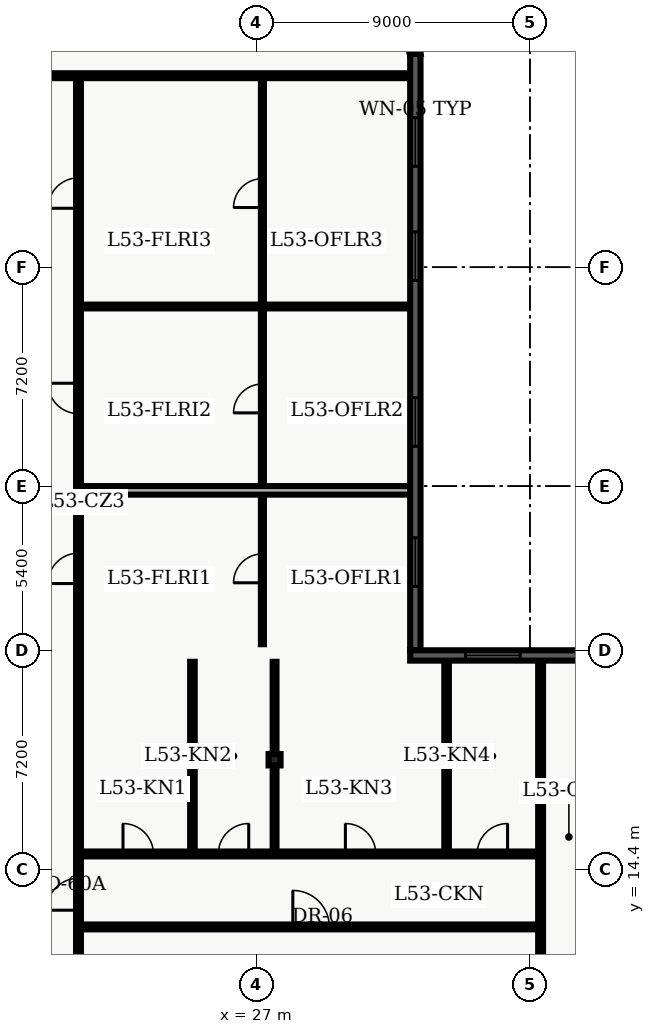
"""IFC4 building model, lengths in metres.
Left out: names, types, materials, properties, quantities, classifications, styles, units other than length and angle.
Written with IfcOpenShell. Run it as: python <this file> out.ifc"""

import sys

from ifc_helpers import new_model, entity, si_unit, converted_unit, direction, frame, origin_with_axes, origin_2d_with_axis, place, context, subcontext, project, spatial, polyline, rectangle, i_section, outline, extrude, element, fill, save


model = new_model("IFC4")
c1 = context("Model", 3, precision=1e-05, world=origin_with_axes(), true_north=direction((0.0, 1.0)))
c2 = subcontext(c1, "Body", "Model", "MODEL_VIEW")
j1 = project(units=[si_unit("LENGTHUNIT", "METRE"), converted_unit("PLANEANGLEUNIT", "DEGREE", entity("IfcPlaneAngleMeasure", 0.017), si_unit("PLANEANGLEUNIT", "RADIAN"), dimensions=[0, 0, 0, 0, 0, 0, 0])], contexts=[c1])
p1 = place(None, origin_with_axes())
s1 = spatial("IfcSite", under=j1, at=p1, CompositionType="ELEMENT")
p2 = place(p1, origin_with_axes())
s2 = spatial("IfcBuilding", under=s1, at=p2, CompositionType="ELEMENT")
p3 = place(p2, frame((0.0, 0.0, 216.0), z_axis=(0.0, 0.0, 1.0), x_axis=(1.0, 0.0, 0.0)))
s3 = spatial("IfcBuildingStorey", under=s2, at=p3, CompositionType="ELEMENT", Elevation=216.0)
p4 = place(p3, frame((27.6, 18.0, 0.0), z_axis=(0.0, 0.0, 1.0), x_axis=(1.0, 0.0, 0.0)))
e1 = element("IfcColumn", 1, at=p4, inside=s3, PredefinedType="COLUMN", context=c2, shape_type="SweptSolid", body=[
    extrude(i_section(OverallWidth=0.394, OverallDepth=0.375, WebThickness=0.017, FlangeThickness=0.028, FilletRadius=0.02, at=origin_2d_with_axis()), origin_with_axes(), (0.0, 0.0, 1.0), 3.9),
])
p5 = place(p3, frame((2.6, 40.5, 0.0), z_axis=(0.0, 0.0, 1.0), x_axis=(1.0, 0.0, 0.0)))
e2 = element("IfcWall", 2, at=p5, inside=s3, PredefinedType="PARTITIONING", context=c2, shape_type="SweptSolid", body=[
    extrude(outline(polyline([(0.0, -0.08), (29.465, -0.08), (29.465, 0.08), (0.0, 0.08), (0.0, -0.08)])), origin_with_axes(), (0.0, 0.0, 1.0), 2.64),
])
p6 = place(p5, frame((8.755, 0.0, 0.0), z_axis=(0.0, 0.0, 1.0), x_axis=(1.0, 0.0, 0.0)))
e3 = element("IfcOpeningElement", 3, at=p6, cuts=e2, PredefinedType="OPENING", context=c2, shape_type="SweptSolid", body=[
    extrude(rectangle(XDim=1.0, YDim=0.18, at=origin_2d_with_axis()), origin_with_axes(), (0.0, 0.0, 1.0), 2.15),
])
p7 = place(p3, frame((21.15, 7.8, 0.0), z_axis=(0.0, 0.0, 1.0), x_axis=(0.0, 1.0, 0.0)))
e4 = element("IfcWall", 4, at=p7, inside=s3, PredefinedType="PARTITIONING", context=c2, shape_type="SweptSolid", body=[
    extrude(outline(polyline([(0.0, -0.08), (32.7, -0.08), (32.7, 0.08), (0.0, 0.08), (0.0, -0.08)])), origin_with_axes(), (0.0, 0.0, 1.0), 2.64),
])
p8 = place(p7, frame((16.495, 0.0, 0.0), z_axis=(0.0, 0.0, 1.0), x_axis=(1.0, 0.0, 0.0)))
e5 = element("IfcOpeningElement", 5, at=p8, cuts=e4, PredefinedType="OPENING", context=c2, shape_type="SweptSolid", body=[
    extrude(rectangle(XDim=1.0, YDim=0.18, at=origin_2d_with_axis()), origin_with_axes(), (0.0, 0.0, 1.0), 2.15),
])
p9 = place(p7, frame((22.084, 0.0, 0.0), z_axis=(0.0, 0.0, 1.0), x_axis=(1.0, 0.0, 0.0)))
e6 = element("IfcOpeningElement", 6, at=p9, cuts=e4, PredefinedType="OPENING", context=c2, shape_type="SweptSolid", body=[
    extrude(rectangle(XDim=1.0, YDim=0.18, at=origin_2d_with_axis()), origin_with_axes(), (0.0, 0.0, 1.0), 2.15),
])
p10 = place(p7, frame((28.839, 0.0, 0.0), z_axis=(0.0, 0.0, 1.0), x_axis=(1.0, 0.0, 0.0)))
e7 = element("IfcOpeningElement", 7, at=p10, cuts=e4, PredefinedType="OPENING", context=c2, shape_type="SweptSolid", body=[
    extrude(rectangle(XDim=1.0, YDim=0.18, at=origin_2d_with_axis()), origin_with_axes(), (0.0, 0.0, 1.0), 2.15),
])
p11 = place(p7, frame((5.775, 0.0, 0.0), z_axis=(0.0, 0.0, 1.0), x_axis=(1.0, 0.0, 0.0)))
e8 = element("IfcOpeningElement", 8, at=p11, cuts=e4, PredefinedType="OPENING", context=c2, shape_type="SweptSolid", body=[
    extrude(rectangle(XDim=1.05, YDim=0.18, at=origin_2d_with_axis()), origin_with_axes(), (0.0, 0.0, 1.0), 2.15),
])
p12 = place(p3, frame((27.2, 21.8, 0.0), z_axis=(0.0, 0.0, 1.0), x_axis=(0.0, 1.0, 0.0)))
e9 = element("IfcWall", 9, at=p12, inside=s3, PredefinedType="PARTITIONING", context=c2, shape_type="SweptSolid", body=[
    extrude(outline(polyline([(0.0, -0.05), (18.5, -0.05), (18.5, 0.05), (0.0, 0.05), (0.0, -0.05)])), origin_with_axes(), (0.0, 0.0, 1.0), 2.64),
])
p13 = place(p12, frame((2.495, 0.0, 0.0), z_axis=(0.0, 0.0, 1.0), x_axis=(1.0, 0.0, 0.0)))
e10 = element("IfcOpeningElement", 10, at=p13, cuts=e9, PredefinedType="OPENING", context=c2, shape_type="SweptSolid", body=[
    extrude(rectangle(XDim=0.95, YDim=0.12, at=origin_2d_with_axis()), origin_with_axes(), (0.0, 0.0, 1.0), 2.15),
])
p14 = place(p12, frame((8.084, 0.0, 0.0), z_axis=(0.0, 0.0, 1.0), x_axis=(1.0, 0.0, 0.0)))
e11 = element("IfcOpeningElement", 11, at=p14, cuts=e9, PredefinedType="OPENING", context=c2, shape_type="SweptSolid", body=[
    extrude(rectangle(XDim=0.95, YDim=0.12, at=origin_2d_with_axis()), origin_with_axes(), (0.0, 0.0, 1.0), 2.15),
])
p15 = place(p12, frame((14.839, 0.0, 0.0), z_axis=(0.0, 0.0, 1.0), x_axis=(1.0, 0.0, 0.0)))
e12 = element("IfcOpeningElement", 12, at=p15, cuts=e9, PredefinedType="OPENING", context=c2, shape_type="SweptSolid", body=[
    extrude(rectangle(XDim=0.95, YDim=0.12, at=origin_2d_with_axis()), origin_with_axes(), (0.0, 0.0, 1.0), 2.15),
])
p16 = place(p3, frame((21.3, 26.86, 0.0), z_axis=(0.0, 0.0, 1.0), x_axis=(1.0, 0.0, 0.0)))
e13 = element("IfcWall", 13, at=p16, inside=s3, PredefinedType="PARTITIONING", context=c2, shape_type="SweptSolid", body=[
    extrude(outline(polyline([(0.0, -0.14), (10.765, -0.14), (10.765, 0.14), (0.0, 0.14), (0.0, -0.14)])), origin_with_axes(), (0.0, 0.0, 1.0), 2.64),
])
p17 = place(p3, frame((21.3, 32.908, 0.0), z_axis=(0.0, 0.0, 1.0), x_axis=(1.0, 0.0, 0.0)))
e14 = element("IfcWall", 14, at=p17, inside=s3, PredefinedType="PARTITIONING", context=c2, shape_type="SweptSolid", body=[
    extrude(outline(polyline([(0.0, -0.062), (10.765, -0.062), (10.765, 0.062), (0.0, 0.062), (0.0, -0.062)])), origin_with_axes(), (0.0, 0.0, 1.0), 2.64),
])
p18 = place(p3, frame((21.15, 12.5, 0.0), z_axis=(0.0, 0.0, 1.0), x_axis=(1.0, 0.0, 0.0)))
e15 = element("IfcWall", 15, at=p18, inside=s3, PredefinedType="PARTITIONING", context=c2, shape_type="SweptSolid", body=[
    extrude(outline(polyline([(0.0, -0.08), (15.2, -0.08), (15.2, 0.08), (0.0, 0.08), (0.0, -0.08)])), origin_with_axes(), (0.0, 0.0, 1.0), 2.64),
])
p19 = place(p18, frame((7.65, 0.0, 0.0), z_axis=(0.0, 0.0, 1.0), x_axis=(1.0, 0.0, 0.0)))
e16 = element("IfcOpeningElement", 16, at=p19, cuts=e15, PredefinedType="OPENING", context=c2, shape_type="SweptSolid", body=[
    extrude(rectangle(XDim=1.2, YDim=0.18, at=origin_2d_with_axis()), origin_with_axes(), (0.0, 0.0, 1.0), 2.2),
])
p20 = place(p3, frame((21.15, 14.9, 0.0), z_axis=(0.0, 0.0, 1.0), x_axis=(1.0, 0.0, 0.0)))
e17 = element("IfcWall", 17, at=p20, inside=s3, PredefinedType="PARTITIONING", context=c2, shape_type="SweptSolid", body=[
    extrude(outline(polyline([(0.0, -0.08), (15.2, -0.08), (15.2, 0.08), (0.0, 0.08), (0.0, -0.08)])), origin_with_axes(), (0.0, 0.0, 1.0), 2.64),
])
p21 = place(p20, frame((1.964, 0.0, 0.0), z_axis=(0.0, 0.0, 1.0), x_axis=(1.0, 0.0, 0.0)))
e18 = element("IfcOpeningElement", 18, at=p21, cuts=e17, PredefinedType="OPENING", context=c2, shape_type="SweptSolid", body=[
    extrude(rectangle(XDim=1.0, YDim=0.18, at=origin_2d_with_axis()), origin_with_axes(), (0.0, 0.0, 1.0), 2.15),
])
p22 = place(p20, frame((5.099, 0.0, 0.0), z_axis=(0.0, 0.0, 1.0), x_axis=(1.0, 0.0, 0.0)))
e19 = element("IfcOpeningElement", 19, at=p22, cuts=e17, PredefinedType="OPENING", context=c2, shape_type="SweptSolid", body=[
    extrude(rectangle(XDim=1.0, YDim=0.18, at=origin_2d_with_axis()), origin_with_axes(), (0.0, 0.0, 1.0), 2.15),
])
p23 = place(p20, frame((9.279, 0.0, 0.0), z_axis=(0.0, 0.0, 1.0), x_axis=(1.0, 0.0, 0.0)))
e20 = element("IfcOpeningElement", 20, at=p23, cuts=e17, PredefinedType="OPENING", context=c2, shape_type="SweptSolid", body=[
    extrude(rectangle(XDim=1.0, YDim=0.18, at=origin_2d_with_axis()), origin_with_axes(), (0.0, 0.0, 1.0), 2.15),
])
p24 = place(p20, frame((13.614, 0.0, 0.0), z_axis=(0.0, 0.0, 1.0), x_axis=(1.0, 0.0, 0.0)))
e21 = element("IfcOpeningElement", 21, at=p24, cuts=e17, PredefinedType="OPENING", context=c2, shape_type="SweptSolid", body=[
    extrude(rectangle(XDim=1.0, YDim=0.18, at=origin_2d_with_axis()), origin_with_axes(), (0.0, 0.0, 1.0), 2.15),
])
p25 = place(p3, frame((36.35, 4.35, 0.0), z_axis=(0.0, 0.0, 1.0), x_axis=(0.0, 1.0, 0.0)))
e22 = element("IfcWall", 22, at=p25, inside=s3, PredefinedType="PARTITIONING", context=c2, shape_type="SweptSolid", body=[
    extrude(outline(polyline([(0.0, -0.08), (16.95, -0.08), (16.95, 0.08), (0.0, 0.08), (0.0, -0.08)])), origin_with_axes(), (0.0, 0.0, 1.0), 2.64),
])
p26 = place(p3, frame((24.898, 15.02, 0.0), z_axis=(0.0, 0.0, 1.0), x_axis=(0.0, 1.0, 0.0)))
e23 = element("IfcWall", 23, at=p26, inside=s3, PredefinedType="PARTITIONING", context=c2, shape_type="SweptSolid", body=[
    extrude(outline(polyline([(0.0, -0.075), (6.2, -0.075), (6.2, 0.075), (0.0, 0.075), (0.0, -0.075)])), origin_with_axes(), (0.0, 0.0, 1.0), 2.64),
])
p27 = place(p3, frame((27.6, 15.02, 0.0), z_axis=(0.0, 0.0, 1.0), x_axis=(0.0, 1.0, 0.0)))
e24 = element("IfcWall", 24, at=p27, inside=s3, PredefinedType="PARTITIONING", context=c2, shape_type="SweptSolid", body=[
    extrude(outline(polyline([(0.0, -0.062), (6.2, -0.062), (6.2, 0.062), (0.0, 0.062), (0.0, -0.062)])), origin_with_axes(), (0.0, 0.0, 1.0), 2.64),
])
p28 = place(p3, frame((33.258, 15.02, 0.0), z_axis=(0.0, 0.0, 1.0), x_axis=(0.0, 1.0, 0.0)))
e25 = element("IfcWall", 25, at=p28, inside=s3, PredefinedType="PARTITIONING", context=c2, shape_type="SweptSolid", body=[
    extrude(outline(polyline([(0.0, -0.075), (6.245, -0.075), (6.245, 0.075), (0.0, 0.075), (0.0, -0.075)])), origin_with_axes(), (0.0, 0.0, 1.0), 2.64),
])
p29 = place(p3, frame((31.24, 44.875, 0.0), z_axis=(0.0, 0.0, 1.0), x_axis=(0.258697, -0.965958, 0.0)))
e26 = element("IfcWall", 26, at=p29, inside=s3, PredefinedType="SOLIDWALL", context=c2, shape_type="SweptSolid", body=[
    extrude(outline(polyline([(0.0, -0.17), (3.85, -0.17), (3.85, 0.17), (0.0, 0.17), (0.0, -0.17)])), origin_with_axes(), (0.0, 0.0, 1.0), 3.6),
])
p30 = place(p3, frame((32.23, 41.22, 0.0), z_axis=(0.0, 0.0, 1.0), x_axis=(0.0, -1.0, 0.0)))
e27 = element("IfcWall", 27, at=p30, inside=s3, PredefinedType="SOLIDWALL", context=c2, shape_type="SweptSolid", body=[
    extrude(outline(polyline([(0.0, -0.17), (19.62, -0.17), (19.62, 0.17), (0.0, 0.17), (0.0, -0.17)])), origin_with_axes(), (0.0, 0.0, 1.0), 3.6),
])
p31 = place(p30, frame((2.903, 0.0, 0.45), z_axis=(0.0, 0.0, 1.0), x_axis=(1.0, 0.0, 0.0)))
e28 = element("IfcOpeningElement", 28, at=p31, cuts=e27, PredefinedType="OPENING", context=c2, shape_type="SweptSolid", body=[
    extrude(rectangle(XDim=1.6, YDim=0.36, at=origin_2d_with_axis()), origin_with_axes(), (0.0, 0.0, 1.0), 2.2),
])
p32 = place(p30, frame((6.657, 0.0, 0.45), z_axis=(0.0, 0.0, 1.0), x_axis=(1.0, 0.0, 0.0)))
e29 = element("IfcOpeningElement", 29, at=p32, cuts=e27, PredefinedType="OPENING", context=c2, shape_type="SweptSolid", body=[
    extrude(rectangle(XDim=1.6, YDim=0.36, at=origin_2d_with_axis()), origin_with_axes(), (0.0, 0.0, 1.0), 2.2),
])
p33 = place(p30, frame((12.112, 0.0, 0.45), z_axis=(0.0, 0.0, 1.0), x_axis=(1.0, 0.0, 0.0)))
e30 = element("IfcOpeningElement", 30, at=p33, cuts=e27, PredefinedType="OPENING", context=c2, shape_type="SweptSolid", body=[
    extrude(rectangle(XDim=1.6, YDim=0.36, at=origin_2d_with_axis()), origin_with_axes(), (0.0, 0.0, 1.0), 2.2),
])
p34 = place(p30, frame((16.718, 0.0, 0.45), z_axis=(0.0, 0.0, 1.0), x_axis=(1.0, 0.0, 0.0)))
e31 = element("IfcOpeningElement", 31, at=p34, cuts=e27, PredefinedType="OPENING", context=c2, shape_type="SweptSolid", body=[
    extrude(rectangle(XDim=1.6, YDim=0.36, at=origin_2d_with_axis()), origin_with_axes(), (0.0, 0.0, 1.0), 2.2),
])
p35 = place(p3, frame((32.06, 21.43, 0.0), z_axis=(0.0, 0.0, 1.0), x_axis=(1.0, 0.0, 0.0)))
e32 = element("IfcWall", 32, at=p35, inside=s3, PredefinedType="SOLIDWALL", context=c2, shape_type="SweptSolid", body=[
    extrude(outline(polyline([(0.0, -0.17), (6.34, -0.17), (6.34, 0.17), (0.0, 0.17), (0.0, -0.17)])), origin_with_axes(), (0.0, 0.0, 1.0), 3.6),
])
p36 = place(p35, frame((2.72, 0.0, 0.45), z_axis=(0.0, 0.0, 1.0), x_axis=(1.0, 0.0, 0.0)))
e33 = element("IfcOpeningElement", 33, at=p36, cuts=e32, PredefinedType="OPENING", context=c2, shape_type="SweptSolid", body=[
    extrude(rectangle(XDim=1.8, YDim=0.36, at=origin_2d_with_axis()), origin_with_axes(), (0.0, 0.0, 1.0), 2.1),
])
p37 = place(p12, frame((2.495, 0.0, 0.0), z_axis=(0.0, 0.0, 1.0), x_axis=(1.0, 0.0, 0.0)))
e34 = element("IfcDoor", 34, at=p37, inside=s3, OperationType="SINGLE_SWING_LEFT", PredefinedType="DOOR", context=c2, shape_type="SweptSolid", body=[
    extrude(rectangle(XDim=0.95, YDim=0.06, at=origin_2d_with_axis()), origin_with_axes(), (0.0, 0.0, 1.0), 2.15),
])
fill(e10, e34)
p38 = place(p7, frame((16.495, 0.0, 0.0), z_axis=(0.0, 0.0, 1.0), x_axis=(1.0, 0.0, 0.0)))
e35 = element("IfcDoor", 35, at=p38, inside=s3, OperationType="SINGLE_SWING_LEFT", PredefinedType="DOOR", context=c2, shape_type="SweptSolid", body=[
    extrude(rectangle(XDim=1.0, YDim=0.09, at=origin_2d_with_axis()), origin_with_axes(), (0.0, 0.0, 1.0), 2.15),
])
fill(e5, e35)
p39 = place(p12, frame((8.084, 0.0, 0.0), z_axis=(0.0, 0.0, 1.0), x_axis=(1.0, 0.0, 0.0)))
e36 = element("IfcDoor", 36, at=p39, inside=s3, OperationType="SINGLE_SWING_LEFT", PredefinedType="DOOR", context=c2, shape_type="SweptSolid", body=[
    extrude(rectangle(XDim=0.95, YDim=0.06, at=origin_2d_with_axis()), origin_with_axes(), (0.0, 0.0, 1.0), 2.15),
])
fill(e11, e36)
p40 = place(p7, frame((22.084, 0.0, 0.0), z_axis=(0.0, 0.0, 1.0), x_axis=(1.0, 0.0, 0.0)))
e37 = element("IfcDoor", 37, at=p40, inside=s3, OperationType="SINGLE_SWING_RIGHT", PredefinedType="DOOR", context=c2, shape_type="SweptSolid", body=[
    extrude(rectangle(XDim=1.0, YDim=0.09, at=origin_2d_with_axis()), origin_with_axes(), (0.0, 0.0, 1.0), 2.15),
])
fill(e6, e37)
p41 = place(p12, frame((14.839, 0.0, 0.0), z_axis=(0.0, 0.0, 1.0), x_axis=(1.0, 0.0, 0.0)))
e38 = element("IfcDoor", 38, at=p41, inside=s3, OperationType="SINGLE_SWING_LEFT", PredefinedType="DOOR", context=c2, shape_type="SweptSolid", body=[
    extrude(rectangle(XDim=0.95, YDim=0.06, at=origin_2d_with_axis()), origin_with_axes(), (0.0, 0.0, 1.0), 2.15),
])
fill(e12, e38)
p42 = place(p7, frame((28.839, 0.0, 0.0), z_axis=(0.0, 0.0, 1.0), x_axis=(1.0, 0.0, 0.0)))
e39 = element("IfcDoor", 39, at=p42, inside=s3, OperationType="SINGLE_SWING_LEFT", PredefinedType="DOOR", context=c2, shape_type="SweptSolid", body=[
    extrude(rectangle(XDim=1.0, YDim=0.09, at=origin_2d_with_axis()), origin_with_axes(), (0.0, 0.0, 1.0), 2.15),
])
fill(e7, e39)
p43 = place(p7, frame((5.775, 0.0, 0.0), z_axis=(0.0, 0.0, 1.0), x_axis=(1.0, 0.0, 0.0)))
e40 = element("IfcDoor", 40, at=p43, inside=s3, OperationType="SINGLE_SWING_LEFT", PredefinedType="DOOR", context=c2, shape_type="SweptSolid", body=[
    extrude(rectangle(XDim=1.05, YDim=0.09, at=origin_2d_with_axis()), origin_with_axes(), (0.0, 0.0, 1.0), 2.15),
])
fill(e8, e40)
p44 = place(p18, frame((7.65, 0.0, 0.0), z_axis=(0.0, 0.0, 1.0), x_axis=(1.0, 0.0, 0.0)))
e41 = element("IfcDoor", 41, at=p44, inside=s3, OperationType="SINGLE_SWING_LEFT", PredefinedType="DOOR", context=c2, shape_type="SweptSolid", body=[
    extrude(rectangle(XDim=1.2, YDim=0.09, at=origin_2d_with_axis()), origin_with_axes(), (0.0, 0.0, 1.0), 2.2),
])
fill(e16, e41)
p45 = place(p20, frame((1.964, 0.0, 0.0), z_axis=(0.0, 0.0, 1.0), x_axis=(1.0, 0.0, 0.0)))
e42 = element("IfcDoor", 42, at=p45, inside=s3, OperationType="SINGLE_SWING_LEFT", PredefinedType="DOOR", context=c2, shape_type="SweptSolid", body=[
    extrude(rectangle(XDim=1.0, YDim=0.09, at=origin_2d_with_axis()), origin_with_axes(), (0.0, 0.0, 1.0), 2.15),
])
fill(e18, e42)
p46 = place(p20, frame((5.099, 0.0, 0.0), z_axis=(0.0, 0.0, 1.0), x_axis=(1.0, 0.0, 0.0)))
e43 = element("IfcDoor", 43, at=p46, inside=s3, OperationType="SINGLE_SWING_RIGHT", PredefinedType="DOOR", context=c2, shape_type="SweptSolid", body=[
    extrude(rectangle(XDim=1.0, YDim=0.09, at=origin_2d_with_axis()), origin_with_axes(), (0.0, 0.0, 1.0), 2.15),
])
fill(e19, e43)
p47 = place(p20, frame((9.279, 0.0, 0.0), z_axis=(0.0, 0.0, 1.0), x_axis=(1.0, 0.0, 0.0)))
e44 = element("IfcDoor", 44, at=p47, inside=s3, OperationType="SINGLE_SWING_LEFT", PredefinedType="DOOR", context=c2, shape_type="SweptSolid", body=[
    extrude(rectangle(XDim=1.0, YDim=0.09, at=origin_2d_with_axis()), origin_with_axes(), (0.0, 0.0, 1.0), 2.15),
])
fill(e20, e44)
p48 = place(p20, frame((13.614, 0.0, 0.0), z_axis=(0.0, 0.0, 1.0), x_axis=(1.0, 0.0, 0.0)))
e45 = element("IfcDoor", 45, at=p48, inside=s3, OperationType="SINGLE_SWING_RIGHT", PredefinedType="DOOR", context=c2, shape_type="SweptSolid", body=[
    extrude(rectangle(XDim=1.0, YDim=0.09, at=origin_2d_with_axis()), origin_with_axes(), (0.0, 0.0, 1.0), 2.15),
])
fill(e21, e45)
p49 = place(p30, frame((2.903, 0.0, 0.45), z_axis=(0.0, 0.0, 1.0), x_axis=(1.0, 0.0, 0.0)))
e46 = element("IfcWindow", 46, at=p49, inside=s3, PredefinedType="WINDOW", context=c2, shape_type="SweptSolid", body=[
    extrude(rectangle(XDim=1.6, YDim=0.09, at=origin_2d_with_axis()), origin_with_axes(), (0.0, 0.0, 1.0), 2.2),
])
fill(e28, e46)
p50 = place(p30, frame((6.657, 0.0, 0.45), z_axis=(0.0, 0.0, 1.0), x_axis=(1.0, 0.0, 0.0)))
e47 = element("IfcWindow", 47, at=p50, inside=s3, PredefinedType="WINDOW", context=c2, shape_type="SweptSolid", body=[
    extrude(rectangle(XDim=1.6, YDim=0.09, at=origin_2d_with_axis()), origin_with_axes(), (0.0, 0.0, 1.0), 2.2),
])
fill(e29, e47)
p51 = place(p30, frame((12.112, 0.0, 0.45), z_axis=(0.0, 0.0, 1.0), x_axis=(1.0, 0.0, 0.0)))
e48 = element("IfcWindow", 48, at=p51, inside=s3, PredefinedType="WINDOW", context=c2, shape_type="SweptSolid", body=[
    extrude(rectangle(XDim=1.6, YDim=0.09, at=origin_2d_with_axis()), origin_with_axes(), (0.0, 0.0, 1.0), 2.2),
])
fill(e30, e48)
p52 = place(p30, frame((16.718, 0.0, 0.45), z_axis=(0.0, 0.0, 1.0), x_axis=(1.0, 0.0, 0.0)))
e49 = element("IfcWindow", 49, at=p52, inside=s3, PredefinedType="WINDOW", context=c2, shape_type="SweptSolid", body=[
    extrude(rectangle(XDim=1.6, YDim=0.09, at=origin_2d_with_axis()), origin_with_axes(), (0.0, 0.0, 1.0), 2.2),
])
fill(e31, e49)
p53 = place(p35, frame((2.72, 0.0, 0.45), z_axis=(0.0, 0.0, 1.0), x_axis=(1.0, 0.0, 0.0)))
e50 = element("IfcWindow", 50, at=p53, inside=s3, PredefinedType="WINDOW", context=c2, shape_type="SweptSolid", body=[
    extrude(rectangle(XDim=1.8, YDim=0.09, at=origin_2d_with_axis()), origin_with_axes(), (0.0, 0.0, 1.0), 2.1),
])
fill(e33, e50)
save(model, sys.argv[1])
